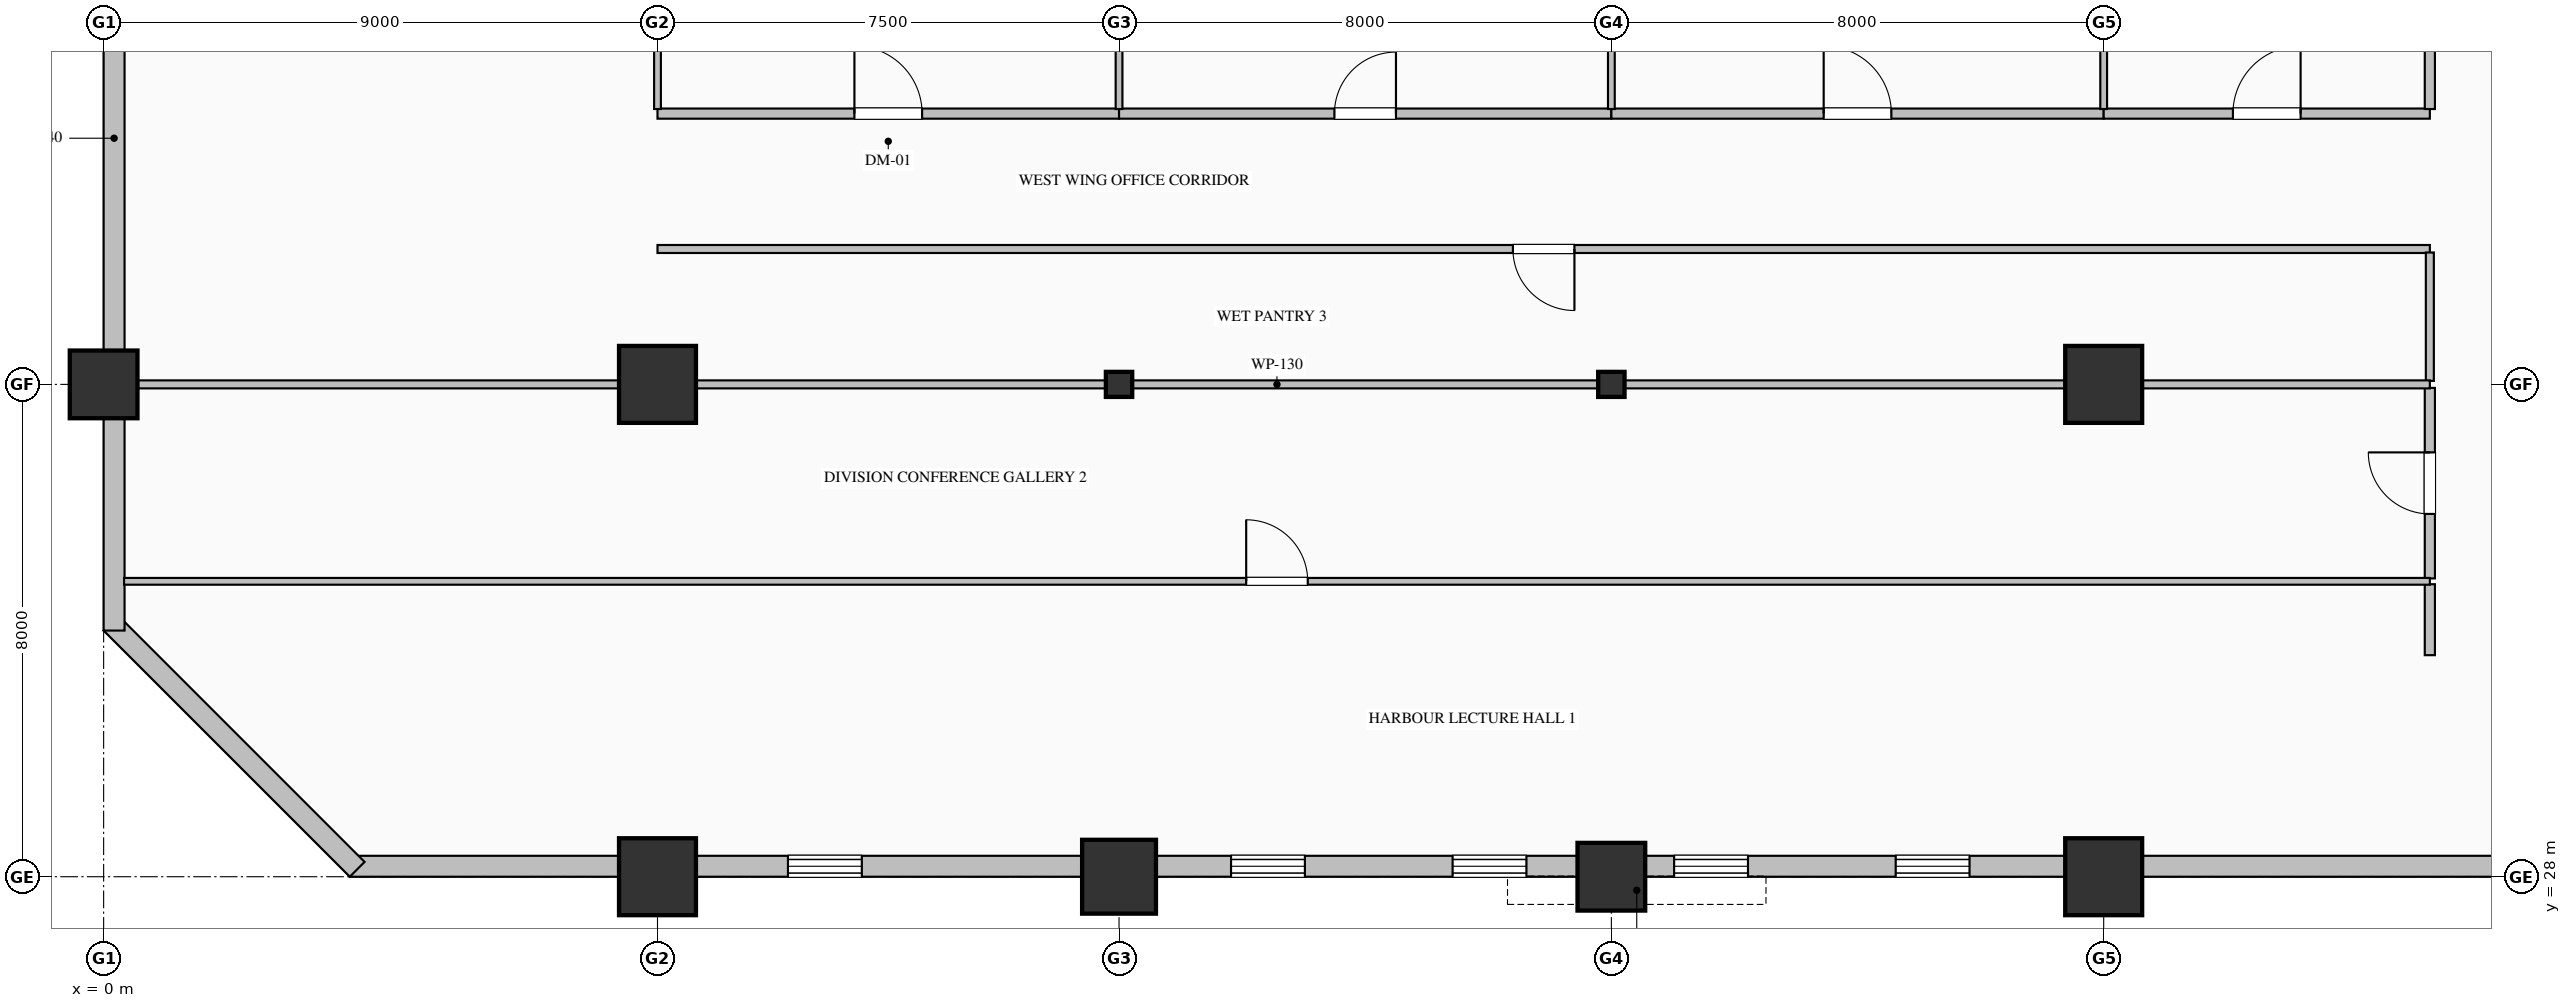
"""IFC4 building model, lengths in metres.
Left out: names, types, materials, properties, quantities, classifications, styles, units other than length and angle.
Written with IfcOpenShell. Run it as: python <this file> out.ifc"""

import sys

from ifc_helpers import new_model, si_unit, direction, frame, frame_2d, origin, origin_2d, place, context, subcontext, project, spatial, rectangle, hollow_rectangle, hollow_circle, i_section, extrude, element, fill, save


model = new_model("IFC4")
c1 = context("Model", 3, precision=1e-05, world=origin(), true_north=direction((0.0, 1.0)))
c2 = subcontext(c1, "Body", "Model", "MODEL_VIEW")
j1 = project(units=[si_unit("LENGTHUNIT", "METRE"), si_unit("PLANEANGLEUNIT", "RADIAN")], contexts=[c1])
p1 = place(None, origin())
s1 = spatial("IfcSite", under=j1, at=p1, CompositionType="ELEMENT")
p2 = place(p1, origin())
s2 = spatial("IfcBuilding", under=s1, at=p2, CompositionType="ELEMENT")
p3 = place(p2, frame((0.0, 0.0, 48.2)))
s3 = spatial("IfcBuildingStorey", under=s2, at=p3, CompositionType="ELEMENT", Elevation=48.2)
p4 = place(p3, frame((0.0, 36.0, 0.0), z_axis=(0.0, 0.0, 1.0), x_axis=(1.0, 0.0, 0.0)))
e1 = element("IfcColumn", 1, at=p4, inside=s3, PredefinedType="COLUMN", context=c2, shape_type="SweptSolid", body=[
    extrude(hollow_rectangle(XDim=1.1, YDim=1.1, WallThickness=0.04, at=origin_2d()), origin(), (0.0, 0.0, 1.0), 4.0),
])
for number, where, z_axis, x_axis in (
    (2, (9.0, 28.0, 0.0), (0.0, 0.0, 1.0), (1.0, 0.0, 0.0)),
    (3, (9.0, 36.0, 0.0), (0.0, 0.0, 1.0), (1.0, 0.0, 0.0)),
):
    element("IfcColumn", number, at=place(p3, frame(where, z_axis=z_axis, x_axis=x_axis)), inside=s3, PredefinedType="COLUMN", context=c2, shape_type="SweptSolid", body=[
        extrude(hollow_rectangle(XDim=1.25, YDim=1.25, WallThickness=0.045, at=origin_2d()), origin(), (0.0, 0.0, 1.0), 4.0),
    ])
p5 = place(p3, frame((16.5, 28.0, 0.0), z_axis=(0.0, 0.0, 1.0), x_axis=(1.0, 0.0, 0.0)))
e4 = element("IfcColumn", 4, at=p5, inside=s3, PredefinedType="COLUMN", context=c2, shape_type="SweptSolid", body=[
    extrude(hollow_circle(Radius=0.6, WallThickness=0.04, at=origin_2d()), origin(), (0.0, 0.0, 1.0), 4.0),
])
p6 = place(p3, frame((16.5, 36.0, 0.0), z_axis=(0.0, 0.0, 1.0), x_axis=(1.0, 0.0, 0.0)))
e5 = element("IfcColumn", 5, at=p6, inside=s3, PredefinedType="COLUMN", context=c2, shape_type="SweptSolid", body=[
    extrude(i_section(OverallWidth=0.407, OverallDepth=0.428, WebThickness=0.02, FlangeThickness=0.035, FilletRadius=0.022, at=origin_2d()), origin(), (0.0, 0.0, 1.0), 4.0),
])
p7 = place(p3, frame((24.5, 28.0, 0.0), z_axis=(0.0, 0.0, 1.0), x_axis=(1.0, 0.0, 0.0)))
e6 = element("IfcColumn", 6, at=p7, inside=s3, PredefinedType="COLUMN", context=c2, shape_type="SweptSolid", body=[
    extrude(hollow_rectangle(XDim=1.1, YDim=1.1, WallThickness=0.04, at=origin_2d()), origin(), (0.0, 0.0, 1.0), 4.0),
])
p8 = place(p3, frame((24.5, 36.0, 0.0), z_axis=(0.0, 0.0, 1.0), x_axis=(1.0, 0.0, 0.0)))
e7 = element("IfcColumn", 7, at=p8, inside=s3, PredefinedType="COLUMN", context=c2, shape_type="SweptSolid", body=[
    extrude(i_section(OverallWidth=0.407, OverallDepth=0.428, WebThickness=0.02, FlangeThickness=0.035, FilletRadius=0.022, at=origin_2d()), origin(), (0.0, 0.0, 1.0), 4.0),
])
for number, where, z_axis, x_axis in (
    (8, (32.5, 28.0, 0.0), (0.0, 0.0, 1.0), (1.0, 0.0, 0.0)),
    (9, (32.5, 36.0, 0.0), (0.0, 0.0, 1.0), (1.0, 0.0, 0.0)),
):
    element("IfcColumn", number, at=place(p3, frame(where, z_axis=z_axis, x_axis=x_axis)), inside=s3, PredefinedType="COLUMN", context=c2, shape_type="SweptSolid", body=[
        extrude(hollow_rectangle(XDim=1.25, YDim=1.25, WallThickness=0.045, at=origin_2d()), origin(), (0.0, 0.0, 1.0), 4.0),
    ])
p9 = place(p3, frame((40.52, 28.17, 0.0), z_axis=(0.0, 0.0, 1.0), x_axis=(-1.0, 0.0, 0.0)))
e10 = element("IfcWall", 10, at=p9, inside=s3, PredefinedType="SOLIDWALL", context=c2, shape_type="SweptSolid", body=[
    extrude(rectangle(XDim=36.52, YDim=0.34, at=frame_2d((18.26, 0.0))), origin(), (0.0, 0.0, 1.0), 3.05),
])
p10 = place(p9, frame((10.2, 0.0, 0.7)))
e11 = element("IfcOpeningElement", 11, at=p10, cuts=e10, PredefinedType="OPENING", context=c2, shape_type="SweptSolid", body=[
    extrude(rectangle(XDim=1.2, YDim=1.85, at=frame_2d((0.6, 0.925))), frame((0.0, 0.18, 0.0), z_axis=(0.0, -1.0, 0.0), x_axis=(1.0, 0.0, 0.0)), (0.0, 0.0, 1.0), 0.36),
])
p11 = place(p9, frame((13.8, 0.0, 0.7)))
e12 = element("IfcOpeningElement", 12, at=p11, cuts=e10, PredefinedType="OPENING", context=c2, shape_type="SweptSolid", body=[
    extrude(rectangle(XDim=1.2, YDim=1.85, at=frame_2d((0.6, 0.925))), frame((0.0, 0.18, 0.0), z_axis=(0.0, -1.0, 0.0), x_axis=(1.0, 0.0, 0.0)), (0.0, 0.0, 1.0), 0.36),
])
p12 = place(p9, frame((17.4, 0.0, 0.7)))
e13 = element("IfcOpeningElement", 13, at=p12, cuts=e10, PredefinedType="OPENING", context=c2, shape_type="SweptSolid", body=[
    extrude(rectangle(XDim=1.2, YDim=1.85, at=frame_2d((0.6, 0.925))), frame((0.0, 0.18, 0.0), z_axis=(0.0, -1.0, 0.0), x_axis=(1.0, 0.0, 0.0)), (0.0, 0.0, 1.0), 0.36),
])
p13 = place(p9, frame((21.0, 0.0, 0.7)))
e14 = element("IfcOpeningElement", 14, at=p13, cuts=e10, PredefinedType="OPENING", context=c2, shape_type="SweptSolid", body=[
    extrude(rectangle(XDim=1.2, YDim=1.85, at=frame_2d((0.6, 0.925))), frame((0.0, 0.18, 0.0), z_axis=(0.0, -1.0, 0.0), x_axis=(1.0, 0.0, 0.0)), (0.0, 0.0, 1.0), 0.36),
])
p14 = place(p9, frame((28.2, 0.0, 0.7)))
e15 = element("IfcOpeningElement", 15, at=p14, cuts=e10, PredefinedType="OPENING", context=c2, shape_type="SweptSolid", body=[
    extrude(rectangle(XDim=1.2, YDim=1.85, at=frame_2d((0.6, 0.925))), frame((0.0, 0.18, 0.0), z_axis=(0.0, -1.0, 0.0), x_axis=(1.0, 0.0, 0.0)), (0.0, 0.0, 1.0), 0.36),
])
p15 = place(p3, frame((4.12, 28.12, 0.0), z_axis=(0.0, 0.0, 1.0), x_axis=(-0.707106781187, 0.707106781187, 0.0)))
e16 = element("IfcWall", 16, at=p15, inside=s3, PredefinedType="SOLIDWALL", context=c2, shape_type="SweptSolid", body=[
    extrude(rectangle(XDim=5.657, YDim=0.34, at=frame_2d((2.828, 0.0))), origin(), (0.0, 0.0, 1.0), 3.75),
])
p16 = place(p3, frame((0.17, 32.0, 0.0), z_axis=(0.0, 0.0, 1.0), x_axis=(0.0, 1.0, 0.0)))
e17 = element("IfcWall", 17, at=p16, inside=s3, PredefinedType="SOLIDWALL", context=c2, shape_type="SweptSolid", body=[
    extrude(rectangle(XDim=16.0, YDim=0.34, at=frame_2d((8.0, 0.0))), origin(), (0.0, 0.0, 1.0), 3.25),
])
p17 = place(p3, frame((9.0, 40.4, 0.0), z_axis=(0.0, 0.0, 1.0), x_axis=(1.0, 0.0, 0.0)))
e18 = element("IfcWall", 18, at=p17, inside=s3, PredefinedType="PARTITIONING", context=c2, shape_type="SweptSolid", body=[
    extrude(rectangle(XDim=7.5, YDim=0.165, at=frame_2d((3.75, 0.0))), origin(), (0.0, 0.0, 1.0), 3.75),
])
p18 = place(p17, frame((3.2, 0.0, 0.0)))
e19 = element("IfcOpeningElement", 19, at=p18, cuts=e18, PredefinedType="OPENING", context=c2, shape_type="SweptSolid", body=[
    extrude(rectangle(XDim=1.1, YDim=2.2, at=frame_2d((0.55, 1.1))), frame((0.0, 0.093, 0.0), z_axis=(0.0, -1.0, 0.0), x_axis=(1.0, 0.0, 0.0)), (0.0, 0.0, 1.0), 0.185),
])
p19 = place(p3, frame((16.5, 40.4, 0.0), z_axis=(0.0, 0.0, 1.0), x_axis=(1.0, 0.0, 0.0)))
e20 = element("IfcWall", 20, at=p19, inside=s3, PredefinedType="PARTITIONING", context=c2, shape_type="SweptSolid", body=[
    extrude(rectangle(XDim=8.0, YDim=0.165, at=frame_2d((4.0, 0.0))), origin(), (0.0, 0.0, 1.0), 3.75),
])
p20 = place(p19, frame((3.5, 0.0, 0.0)))
e21 = element("IfcOpeningElement", 21, at=p20, cuts=e20, PredefinedType="OPENING", context=c2, shape_type="SweptSolid", body=[
    extrude(rectangle(XDim=1.0, YDim=2.15, at=frame_2d((0.5, 1.075))), frame((0.0, 0.093, 0.0), z_axis=(0.0, -1.0, 0.0), x_axis=(1.0, 0.0, 0.0)), (0.0, 0.0, 1.0), 0.185),
])
p21 = place(p3, frame((24.5, 40.4, 0.0), z_axis=(0.0, 0.0, 1.0), x_axis=(1.0, 0.0, 0.0)))
e22 = element("IfcWall", 22, at=p21, inside=s3, PredefinedType="PARTITIONING", context=c2, shape_type="SweptSolid", body=[
    extrude(rectangle(XDim=8.0, YDim=0.165, at=frame_2d((4.0, 0.0))), origin(), (0.0, 0.0, 1.0), 3.75),
])
p22 = place(p21, frame((3.45, 0.0, 0.0)))
e23 = element("IfcOpeningElement", 23, at=p22, cuts=e22, PredefinedType="OPENING", context=c2, shape_type="SweptSolid", body=[
    extrude(rectangle(XDim=1.1, YDim=2.2, at=frame_2d((0.55, 1.1))), frame((0.0, 0.093, 0.0), z_axis=(0.0, -1.0, 0.0), x_axis=(1.0, 0.0, 0.0)), (0.0, 0.0, 1.0), 0.185),
])
p23 = place(p3, frame((32.5, 40.4, 0.0), z_axis=(0.0, 0.0, 1.0), x_axis=(1.0, 0.0, 0.0)))
e24 = element("IfcWall", 24, at=p23, inside=s3, PredefinedType="PARTITIONING", context=c2, shape_type="SweptSolid", body=[
    extrude(rectangle(XDim=5.3, YDim=0.165, at=frame_2d((2.65, 0.0))), origin(), (0.0, 0.0, 1.0), 3.75),
])
p24 = place(p23, frame((2.1, 0.0, 0.0)))
e25 = element("IfcOpeningElement", 25, at=p24, cuts=e24, PredefinedType="OPENING", context=c2, shape_type="SweptSolid", body=[
    extrude(rectangle(XDim=1.1, YDim=2.2, at=frame_2d((0.55, 1.1))), frame((0.0, 0.093, 0.0), z_axis=(0.0, -1.0, 0.0), x_axis=(1.0, 0.0, 0.0)), (0.0, 0.0, 1.0), 0.185),
])
p25 = place(p3, frame((37.8, 38.2, 0.0), z_axis=(0.0, 0.0, 1.0), x_axis=(-1.0, 0.0, 0.0)))
e26 = element("IfcWall", 26, at=p25, inside=s3, PredefinedType="PARTITIONING", context=c2, shape_type="SweptSolid", body=[
    extrude(rectangle(XDim=28.8, YDim=0.13, at=frame_2d((14.4, 0.0))), origin(), (0.0, 0.0, 1.0), 3.75),
])
p26 = place(p25, frame((13.9, 0.0, 0.0)))
e27 = element("IfcOpeningElement", 27, at=p26, cuts=e26, PredefinedType="OPENING", context=c2, shape_type="SweptSolid", body=[
    extrude(rectangle(XDim=1.0, YDim=2.15, at=frame_2d((0.5, 1.075))), frame((0.0, 0.075, 0.0), z_axis=(0.0, -1.0, 0.0), x_axis=(1.0, 0.0, 0.0)), (0.0, 0.0, 1.0), 0.15),
])
p27 = place(p3, frame((37.8, 40.475, 0.0), z_axis=(0.0, 0.0, 1.0), x_axis=(0.0, 1.0, 0.0)))
e28 = element("IfcWall", 28, at=p27, inside=s3, PredefinedType="PARTITIONING", context=c2, shape_type="SweptSolid", body=[
    extrude(rectangle(XDim=3.651, YDim=0.165, at=frame_2d((1.825, 0.0))), origin(), (0.0, 0.0, 1.0), 3.75),
])
p28 = place(p3, frame((37.8, 31.6, 0.0), z_axis=(0.0, 0.0, 1.0), x_axis=(0.0, 1.0, 0.0)))
e29 = element("IfcWall", 29, at=p28, inside=s3, PredefinedType="PARTITIONING", context=c2, shape_type="SweptSolid", body=[
    extrude(rectangle(XDim=1.153, YDim=0.165, at=frame_2d((0.576, 0.0))), origin(), (0.0, 0.0, 1.0), 3.75),
])
p29 = place(p3, frame((37.8, 32.847, 0.0), z_axis=(0.0, 0.0, 1.0), x_axis=(0.0, 1.0, 0.0)))
e30 = element("IfcWall", 30, at=p29, inside=s3, PredefinedType="PARTITIONING", context=c2, shape_type="SweptSolid", body=[
    extrude(rectangle(XDim=3.096, YDim=0.165, at=frame_2d((1.548, 0.0))), origin(), (0.0, 0.0, 1.0), 3.75),
])
p30 = place(p29, frame((1.048, 0.0, 0.0)))
e31 = element("IfcOpeningElement", 31, at=p30, cuts=e30, PredefinedType="OPENING", context=c2, shape_type="SweptSolid", body=[
    extrude(rectangle(XDim=1.0, YDim=2.15, at=frame_2d((0.5, 1.075))), frame((0.0, 0.093, 0.0), z_axis=(0.0, -1.0, 0.0), x_axis=(1.0, 0.0, 0.0)), (0.0, 0.0, 1.0), 0.185),
])
p31 = place(p3, frame((37.8, 36.057, 0.0), z_axis=(0.0, 0.0, 1.0), x_axis=(0.0, 1.0, 0.0)))
e32 = element("IfcWall", 32, at=p31, inside=s3, PredefinedType="PARTITIONING", context=c2, shape_type="SweptSolid", body=[
    extrude(rectangle(XDim=2.086, YDim=0.13, at=frame_2d((1.043, 0.0))), origin(), (0.0, 0.0, 1.0), 3.75),
])
p32 = place(p3, frame((9.0, 51.668, 0.0), z_axis=(0.0, 0.0, 1.0), x_axis=(0.0, -1.0, 0.0)))
e33 = element("IfcWall", 33, at=p32, inside=s3, PredefinedType="MOVABLE", context=c2, shape_type="SweptSolid", body=[
    extrude(rectangle(XDim=11.193, YDim=0.11, at=frame_2d((5.597, 0.0))), origin(), (0.0, 0.0, 1.0), 3.042),
])
p33 = place(p32, frame((5.047, 0.0, 0.0)))
e34 = element("IfcOpeningElement", 34, at=p33, cuts=e33, PredefinedType="OPENING", context=c2, shape_type="SweptSolid", body=[
    extrude(rectangle(XDim=1.1, YDim=2.2, at=frame_2d((0.55, 1.1))), frame((0.0, 0.065, 0.0), z_axis=(0.0, -1.0, 0.0), x_axis=(1.0, 0.0, 0.0)), (0.0, 0.0, 1.0), 0.13),
])
for number, where, z_axis, x_axis in (
    (35, (16.5, 51.668, 0.0), (0.0, 0.0, 1.0), (0.0, -1.0, 0.0)),
    (36, (24.5, 51.668, 0.0), (0.0, 0.0, 1.0), (0.0, -1.0, 0.0)),
):
    element("IfcWall", number, at=place(p3, frame(where, z_axis=z_axis, x_axis=x_axis)), inside=s3, PredefinedType="MOVABLE", context=c2, shape_type="SweptSolid", body=[
        extrude(rectangle(XDim=11.193, YDim=0.11, at=frame_2d((5.597, 0.0))), origin(), (0.0, 0.0, 1.0), 3.042),
    ])
p34 = place(p3, frame((32.5, 51.668, 0.0), z_axis=(0.0, 0.0, 1.0), x_axis=(0.0, -1.0, 0.0)))
e37 = element("IfcWall", 37, at=p34, inside=s3, PredefinedType="MOVABLE", context=c2, shape_type="SweptSolid", body=[
    extrude(rectangle(XDim=11.193, YDim=0.11, at=frame_2d((5.597, 0.0))), origin(), (0.0, 0.0, 1.0), 3.75),
])
p35 = place(p3, frame((0.332, 32.8, 0.0), z_axis=(0.0, 0.0, 1.0), x_axis=(1.0, 0.0, 0.0)))
e38 = element("IfcWall", 38, at=p35, inside=s3, PredefinedType="MOVABLE", context=c2, shape_type="SweptSolid", body=[
    extrude(rectangle(XDim=37.468, YDim=0.11, at=frame_2d((18.734, 0.0))), origin(), (0.0, 0.0, 1.0), 3.75),
])
p36 = place(p35, frame((18.234, 0.0, 0.0)))
e39 = element("IfcOpeningElement", 39, at=p36, cuts=e38, PredefinedType="OPENING", context=c2, shape_type="SweptSolid", body=[
    extrude(rectangle(XDim=1.0, YDim=2.15, at=frame_2d((0.5, 1.075))), frame((0.0, 0.065, 0.0), z_axis=(0.0, -1.0, 0.0), x_axis=(1.0, 0.0, 0.0)), (0.0, 0.0, 1.0), 0.13),
])
p37 = place(p3, frame((0.332, 36.0, 0.0), z_axis=(0.0, 0.0, 1.0), x_axis=(1.0, 0.0, 0.0)))
e40 = element("IfcWall", 40, at=p37, inside=s3, PredefinedType="PARTITIONING", context=c2, shape_type="SweptSolid", body=[
    extrude(rectangle(XDim=37.468, YDim=0.13, at=frame_2d((18.734, 0.0))), origin(), (0.0, 0.0, 1.0), 3.042),
])
p38 = place(p10, origin())
e41 = element("IfcWindow", 41, at=p38, inside=s3, PartitioningType="DOUBLE_PANEL_VERTICAL", PredefinedType="WINDOW", context=c2, shape_type="SweptSolid", body=[
    extrude(rectangle(XDim=1.2, YDim=1.85, at=frame_2d((0.6, 0.925))), frame((0.0, 0.15, 0.0), z_axis=(0.0, -1.0, 0.0), x_axis=(1.0, 0.0, 0.0)), (0.0, 0.0, 1.0), 0.06),
])
fill(e11, e41)
p39 = place(p11, origin())
e42 = element("IfcWindow", 42, at=p39, inside=s3, PartitioningType="DOUBLE_PANEL_VERTICAL", PredefinedType="WINDOW", context=c2, shape_type="SweptSolid", body=[
    extrude(rectangle(XDim=1.2, YDim=1.85, at=frame_2d((0.6, 0.925))), frame((0.0, 0.15, 0.0), z_axis=(0.0, -1.0, 0.0), x_axis=(1.0, 0.0, 0.0)), (0.0, 0.0, 1.0), 0.06),
])
fill(e12, e42)
p40 = place(p12, origin())
e43 = element("IfcWindow", 43, at=p40, inside=s3, PartitioningType="DOUBLE_PANEL_VERTICAL", PredefinedType="WINDOW", context=c2, shape_type="SweptSolid", body=[
    extrude(rectangle(XDim=1.2, YDim=1.85, at=frame_2d((0.6, 0.925))), frame((0.0, 0.15, 0.0), z_axis=(0.0, -1.0, 0.0), x_axis=(1.0, 0.0, 0.0)), (0.0, 0.0, 1.0), 0.06),
])
fill(e13, e43)
p41 = place(p13, origin())
e44 = element("IfcWindow", 44, at=p41, inside=s3, PartitioningType="DOUBLE_PANEL_VERTICAL", PredefinedType="WINDOW", context=c2, shape_type="SweptSolid", body=[
    extrude(rectangle(XDim=1.2, YDim=1.85, at=frame_2d((0.6, 0.925))), frame((0.0, 0.15, 0.0), z_axis=(0.0, -1.0, 0.0), x_axis=(1.0, 0.0, 0.0)), (0.0, 0.0, 1.0), 0.06),
])
fill(e14, e44)
p42 = place(p14, origin())
e45 = element("IfcWindow", 45, at=p42, inside=s3, PartitioningType="DOUBLE_PANEL_VERTICAL", PredefinedType="WINDOW", context=c2, shape_type="SweptSolid", body=[
    extrude(rectangle(XDim=1.2, YDim=1.85, at=frame_2d((0.6, 0.925))), frame((0.0, 0.15, 0.0), z_axis=(0.0, -1.0, 0.0), x_axis=(1.0, 0.0, 0.0)), (0.0, 0.0, 1.0), 0.06),
])
fill(e15, e45)
p43 = place(p18, origin())
e46 = element("IfcDoor", 46, at=p43, inside=s3, OperationType="SINGLE_SWING_LEFT", PredefinedType="DOOR", context=c2, shape_type="SweptSolid", body=[
    extrude(rectangle(XDim=1.1, YDim=2.2, at=frame_2d((0.55, 1.1))), frame((0.0, 0.025, 0.0), z_axis=(0.0, -1.0, 0.0), x_axis=(1.0, 0.0, 0.0)), (0.0, 0.0, 1.0), 0.05),
])
fill(e19, e46)
p44 = place(p20, origin())
e47 = element("IfcDoor", 47, at=p44, inside=s3, OperationType="SINGLE_SWING_RIGHT", PredefinedType="DOOR", context=c2, shape_type="SweptSolid", body=[
    extrude(rectangle(XDim=1.0, YDim=2.15, at=frame_2d((0.5, 1.075))), frame((0.0, 0.025, 0.0), z_axis=(0.0, -1.0, 0.0), x_axis=(1.0, 0.0, 0.0)), (0.0, 0.0, 1.0), 0.05),
])
fill(e21, e47)
p45 = place(p22, origin())
e48 = element("IfcDoor", 48, at=p45, inside=s3, OperationType="SINGLE_SWING_LEFT", PredefinedType="DOOR", context=c2, shape_type="SweptSolid", body=[
    extrude(rectangle(XDim=1.1, YDim=2.2, at=frame_2d((0.55, 1.1))), frame((0.0, 0.025, 0.0), z_axis=(0.0, -1.0, 0.0), x_axis=(1.0, 0.0, 0.0)), (0.0, 0.0, 1.0), 0.05),
])
fill(e23, e48)
p46 = place(p24, origin())
e49 = element("IfcDoor", 49, at=p46, inside=s3, OperationType="SINGLE_SWING_RIGHT", PredefinedType="DOOR", context=c2, shape_type="SweptSolid", body=[
    extrude(rectangle(XDim=1.1, YDim=2.2, at=frame_2d((0.55, 1.1))), frame((0.0, 0.025, 0.0), z_axis=(0.0, -1.0, 0.0), x_axis=(1.0, 0.0, 0.0)), (0.0, 0.0, 1.0), 0.05),
])
fill(e25, e49)
p47 = place(p36, origin())
e50 = element("IfcDoor", 50, at=p47, inside=s3, OperationType="SINGLE_SWING_LEFT", PredefinedType="DOOR", context=c2, shape_type="SweptSolid", body=[
    extrude(rectangle(XDim=1.0, YDim=2.15, at=frame_2d((0.5, 1.075))), frame((0.0, 0.025, 0.0), z_axis=(0.0, -1.0, 0.0), x_axis=(1.0, 0.0, 0.0)), (0.0, 0.0, 1.0), 0.05),
])
fill(e39, e50)
p48 = place(p30, origin())
e51 = element("IfcDoor", 51, at=p48, inside=s3, OperationType="SINGLE_SWING_RIGHT", PredefinedType="DOOR", context=c2, shape_type="SweptSolid", body=[
    extrude(rectangle(XDim=1.0, YDim=2.15, at=frame_2d((0.5, 1.075))), frame((0.0, 0.025, 0.0), z_axis=(0.0, -1.0, 0.0), x_axis=(1.0, 0.0, 0.0)), (0.0, 0.0, 1.0), 0.05),
])
fill(e31, e51)
p49 = place(p26, origin())
e52 = element("IfcDoor", 52, at=p49, inside=s3, OperationType="SINGLE_SWING_LEFT", PredefinedType="DOOR", context=c2, shape_type="SweptSolid", body=[
    extrude(rectangle(XDim=1.0, YDim=2.15, at=frame_2d((0.5, 1.075))), frame((0.0, 0.025, 0.0), z_axis=(0.0, -1.0, 0.0), x_axis=(1.0, 0.0, 0.0)), (0.0, 0.0, 1.0), 0.05),
])
fill(e27, e52)
save(model, sys.argv[1])
